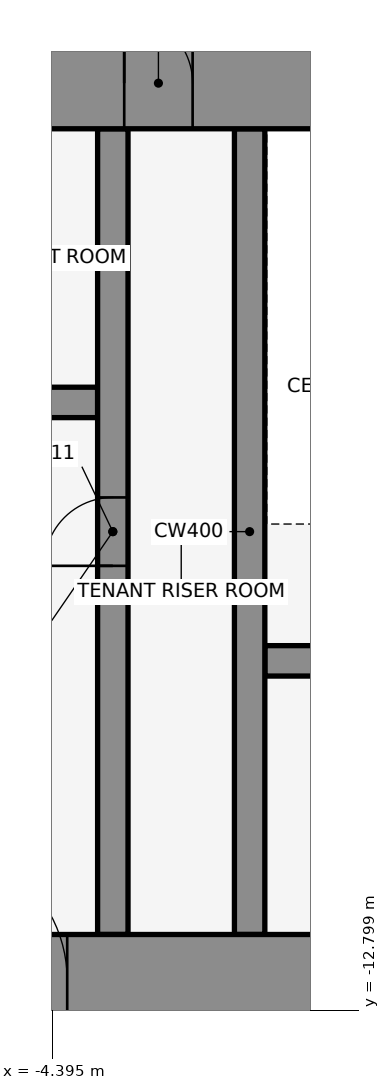
"""IFC4 building model, lengths in metres.
Left out: names, types, materials, properties, quantities, classifications, styles, units other than length and angle.
Written with IfcOpenShell. Run it as: python <this file> out.ifc"""

import sys

from ifc_helpers import new_model, si_unit, direction, frame, frame_2d, origin, place, context, subcontext, project, spatial, rectangle, extrude, element, fill, save


model = new_model("IFC4")
c1 = context("Model", 3, precision=1e-05, world=origin(), true_north=direction((0.0, 1.0)))
c2 = subcontext(c1, "Body", "Model", "MODEL_VIEW")
j1 = project(units=[si_unit("LENGTHUNIT", "METRE"), si_unit("PLANEANGLEUNIT", "RADIAN")], contexts=[c1])
p1 = place(None, origin())
s1 = spatial("IfcSite", under=j1, at=p1, CompositionType="ELEMENT")
p2 = place(p1, origin())
s2 = spatial("IfcBuilding", under=s1, at=p2, CompositionType="ELEMENT")
p3 = place(p2, frame((0.0, 0.0, 342.5)))
s3 = spatial("IfcBuildingStorey", under=s2, at=p3, CompositionType="ELEMENT", Elevation=342.5)
p4 = place(p3, frame((-0.068, -0.105, 0.0), z_axis=(0.0, 0.0, 1.0), x_axis=(-0.83981312244, 0.542875602121, 0.0)))
e1 = element("IfcWall", 1, at=p4, inside=s3, PredefinedType="STANDARD", context=c2, shape_type="SweptSolid", body=[
    extrude(rectangle(XDim=2.183, YDim=0.25, at=frame_2d((1.091, 0.0))), origin(), (0.0, 0.0, 1.0), 5.2),
])
p5 = place(p3, frame((-1.6, -8.2, 0.0), z_axis=(0.0, 0.0, 1.0), x_axis=(1.0, 0.0, 0.0)))
e2 = element("IfcWall", 2, at=p5, inside=s3, PredefinedType="SHEAR", context=c2, shape_type="SweptSolid", body=[
    extrude(rectangle(XDim=3.2, YDim=0.4, at=frame_2d((1.6, 0.0))), origin(), (0.0, 0.0, 1.0), 5.4),
])
p6 = place(p5, frame((1.05, 0.0, 0.0)))
e3 = element("IfcOpeningElement", 3, at=p6, cuts=e2, PredefinedType="OPENING", context=c2, shape_type="SweptSolid", body=[
    extrude(rectangle(XDim=1.2, YDim=2.1, at=frame_2d((0.6, 1.05))), frame((0.0, 0.212, 0.0), z_axis=(0.0, -1.0, 0.0), x_axis=(1.0, 0.0, 0.0)), (0.0, 0.0, 1.0), 0.424),
])
p7 = place(p3, frame((-8.5, -4.8, 0.0), z_axis=(0.0, 0.0, 1.0), x_axis=(1.0, 0.0, 0.0)))
e4 = element("IfcWall", 4, at=p7, inside=s3, PredefinedType="SHEAR", context=c2, shape_type="SweptSolid", body=[
    extrude(rectangle(XDim=4.7, YDim=0.4, at=frame_2d((2.35, 0.0))), origin(), (0.0, 0.0, 1.0), 5.4),
])
p8 = place(p7, frame((0.45, 0.0, 0.0)))
e5 = element("IfcOpeningElement", 5, at=p8, cuts=e4, PredefinedType="OPENING", context=c2, shape_type="SweptSolid", body=[
    extrude(rectangle(XDim=0.9, YDim=2.1, at=frame_2d((0.45, 1.05))), frame((0.0, 0.212, 0.0), z_axis=(0.0, -1.0, 0.0), x_axis=(1.0, 0.0, 0.0)), (0.0, 0.0, 1.0), 0.424),
])
p9 = place(p7, frame((2.85, 0.0, 0.0)))
e6 = element("IfcOpeningElement", 6, at=p9, cuts=e4, PredefinedType="OPENING", context=c2, shape_type="SweptSolid", body=[
    extrude(rectangle(XDim=0.9, YDim=2.1, at=frame_2d((0.45, 1.05))), frame((0.0, 0.212, 0.0), z_axis=(0.0, -1.0, 0.0), x_axis=(1.0, 0.0, 0.0)), (0.0, 0.0, 1.0), 0.424),
])
p10 = place(p3, frame((-3.6, -11.8, 0.0), z_axis=(0.0, 0.0, 1.0), x_axis=(0.0, 1.0, 0.0)))
e7 = element("IfcWall", 7, at=p10, inside=s3, PredefinedType="SHEAR", context=c2, shape_type="SweptSolid", body=[
    extrude(rectangle(XDim=10.6, YDim=0.4, at=frame_2d((5.3, 0.0))), origin(), (0.0, 0.0, 1.0), 5.4),
])
p11 = place(p10, frame((4.85, 0.0, 0.0)))
e8 = element("IfcOpeningElement", 8, at=p11, cuts=e7, PredefinedType="OPENING", context=c2, shape_type="SweptSolid", body=[
    extrude(rectangle(XDim=0.9, YDim=2.1, at=frame_2d((0.45, 1.05))), frame((0.0, 0.212, 0.0), z_axis=(0.0, -1.0, 0.0), x_axis=(1.0, 0.0, 0.0)), (0.0, 0.0, 1.0), 0.424),
])
p12 = place(p3, frame((-1.8, -11.8, 0.0), z_axis=(0.0, 0.0, 1.0), x_axis=(0.0, 1.0, 0.0)))
e9 = element("IfcWall", 9, at=p12, inside=s3, PredefinedType="SHEAR", context=c2, shape_type="SweptSolid", body=[
    extrude(rectangle(XDim=10.6, YDim=0.4, at=frame_2d((5.3, 0.0))), origin(), (0.0, 0.0, 1.0), 5.4),
])
p13 = place(p3, frame((-22.0, -0.6, 0.0), z_axis=(0.0, 0.0, 1.0), x_axis=(1.0, 0.0, 0.0)))
e10 = element("IfcWall", 10, at=p13, inside=s3, PredefinedType="SHEAR", context=c2, shape_type="SweptSolid", body=[
    extrude(rectangle(XDim=44.0, YDim=1.2, at=frame_2d((22.0, 0.0))), origin(), (0.0, 0.0, 1.0), 5.4),
])
p14 = place(p13, frame((18.55, 0.0, 0.0)))
e11 = element("IfcOpeningElement", 11, at=p14, cuts=e10, PredefinedType="OPENING", context=c2, shape_type="SweptSolid", body=[
    extrude(rectangle(XDim=0.9, YDim=2.1, at=frame_2d((0.45, 1.05))), frame((0.0, 0.612, 0.0), z_axis=(0.0, -1.0, 0.0), x_axis=(1.0, 0.0, 0.0)), (0.0, 0.0, 1.0), 1.224),
])
p15 = place(p13, frame((24.55, 0.0, 0.0)))
e12 = element("IfcOpeningElement", 12, at=p15, cuts=e10, PredefinedType="OPENING", context=c2, shape_type="SweptSolid", body=[
    extrude(rectangle(XDim=0.9, YDim=2.1, at=frame_2d((0.45, 1.05))), frame((0.0, 0.612, 0.0), z_axis=(0.0, -1.0, 0.0), x_axis=(1.0, 0.0, 0.0)), (0.0, 0.0, 1.0), 1.224),
])
p16 = place(p3, frame((-22.0, -12.4, 0.0), z_axis=(0.0, 0.0, 1.0), x_axis=(1.0, 0.0, 0.0)))
e13 = element("IfcWall", 13, at=p16, inside=s3, PredefinedType="SHEAR", context=c2, shape_type="SweptSolid", body=[
    extrude(rectangle(XDim=44.0, YDim=1.2, at=frame_2d((22.0, 0.0))), origin(), (0.0, 0.0, 1.0), 5.4),
])
p17 = place(p16, frame((2.2, 0.0, 0.0)))
e14 = element("IfcOpeningElement", 14, at=p17, cuts=e13, PredefinedType="OPENING", context=c2, shape_type="SweptSolid", body=[
    extrude(rectangle(XDim=1.2, YDim=2.1, at=frame_2d((0.6, 1.05))), frame((0.0, 0.612, 0.0), z_axis=(0.0, -1.0, 0.0), x_axis=(1.0, 0.0, 0.0)), (0.0, 0.0, 1.0), 1.224),
])
p18 = place(p16, frame((21.4, 0.0, 0.0)))
e15 = element("IfcOpeningElement", 15, at=p18, cuts=e13, PredefinedType="OPENING", context=c2, shape_type="SweptSolid", body=[
    extrude(rectangle(XDim=1.2, YDim=2.1, at=frame_2d((0.6, 1.05))), frame((0.0, 0.612, 0.0), z_axis=(0.0, -1.0, 0.0), x_axis=(1.0, 0.0, 0.0)), (0.0, 0.0, 1.0), 1.224),
])
p19 = place(p16, frame((40.6, 0.0, 0.0)))
e16 = element("IfcOpeningElement", 16, at=p19, cuts=e13, PredefinedType="OPENING", context=c2, shape_type="SweptSolid", body=[
    extrude(rectangle(XDim=1.2, YDim=2.1, at=frame_2d((0.6, 1.05))), frame((0.0, 0.612, 0.0), z_axis=(0.0, -1.0, 0.0), x_axis=(1.0, 0.0, 0.0)), (0.0, 0.0, 1.0), 1.224),
])
p20 = place(p16, frame((10.75, 0.0, 0.0)))
e17 = element("IfcOpeningElement", 17, at=p20, cuts=e13, PredefinedType="OPENING", context=c2, shape_type="SweptSolid", body=[
    extrude(rectangle(XDim=1.2, YDim=2.1, at=frame_2d((0.6, 1.05))), frame((0.0, 0.612, 0.0), z_axis=(0.0, -1.0, 0.0), x_axis=(1.0, 0.0, 0.0)), (0.0, 0.0, 1.0), 1.224),
])
p21 = place(p16, frame((16.0, 0.0, 0.0)))
e18 = element("IfcOpeningElement", 18, at=p21, cuts=e13, PredefinedType="OPENING", context=c2, shape_type="SweptSolid", body=[
    extrude(rectangle(XDim=1.8, YDim=2.1, at=frame_2d((0.9, 1.05))), frame((0.0, 0.612, 0.0), z_axis=(0.0, -1.0, 0.0), x_axis=(1.0, 0.0, 0.0)), (0.0, 0.0, 1.0), 1.224),
])
p22 = place(p16, frame((6.3, 0.0, 0.0)))
e19 = element("IfcOpeningElement", 19, at=p22, cuts=e13, PredefinedType="OPENING", context=c2, shape_type="SweptSolid", body=[
    extrude(rectangle(XDim=1.2, YDim=2.1, at=frame_2d((0.6, 1.05))), frame((0.0, 0.612, 0.0), z_axis=(0.0, -1.0, 0.0), x_axis=(1.0, 0.0, 0.0)), (0.0, 0.0, 1.0), 1.224),
])
p23 = place(p16, frame((26.2, 0.0, 0.0)))
e20 = element("IfcOpeningElement", 20, at=p23, cuts=e13, PredefinedType="OPENING", context=c2, shape_type="SweptSolid", body=[
    extrude(rectangle(XDim=1.8, YDim=2.1, at=frame_2d((0.9, 1.05))), frame((0.0, 0.612, 0.0), z_axis=(0.0, -1.0, 0.0), x_axis=(1.0, 0.0, 0.0)), (0.0, 0.0, 1.0), 1.224),
])
p24 = place(p16, frame((36.5, 0.0, 0.0)))
e21 = element("IfcOpeningElement", 21, at=p24, cuts=e13, PredefinedType="OPENING", context=c2, shape_type="SweptSolid", body=[
    extrude(rectangle(XDim=1.2, YDim=2.1, at=frame_2d((0.6, 1.05))), frame((0.0, 0.612, 0.0), z_axis=(0.0, -1.0, 0.0), x_axis=(1.0, 0.0, 0.0)), (0.0, 0.0, 1.0), 1.224),
])
p25 = place(p11, frame((0.9, 0.0, 0.0), z_axis=(0.0, 0.0, 1.0), x_axis=(-1.0, 0.0, 0.0)))
e22 = element("IfcDoor", 22, at=p25, inside=s3, OperationType="SINGLE_SWING_RIGHT", PredefinedType="DOOR", context=c2, shape_type="SweptSolid", body=[
    extrude(rectangle(XDim=0.9, YDim=2.1, at=frame_2d((0.45, 1.05))), frame((0.0, 0.025, 0.0), z_axis=(0.0, -1.0, 0.0), x_axis=(1.0, 0.0, 0.0)), (0.0, 0.0, 1.0), 0.05),
])
fill(e8, e22)
p26 = place(p14, origin())
e23 = element("IfcDoor", 23, at=p26, inside=s3, OperationType="SINGLE_SWING_LEFT", PredefinedType="DOOR", context=c2, shape_type="SweptSolid", body=[
    extrude(rectangle(XDim=0.9, YDim=2.1, at=frame_2d((0.45, 1.05))), frame((0.0, 0.025, 0.0), z_axis=(0.0, -1.0, 0.0), x_axis=(1.0, 0.0, 0.0)), (0.0, 0.0, 1.0), 0.05),
])
fill(e11, e23)
p27 = place(p21, origin())
e24 = element("IfcDoor", 24, at=p27, inside=s3, OperationType="SINGLE_SWING_LEFT", PredefinedType="DOOR", context=c2, shape_type="SweptSolid", body=[
    extrude(rectangle(XDim=1.8, YDim=2.1, at=frame_2d((0.9, 1.05))), frame((0.0, 0.025, 0.0), z_axis=(0.0, -1.0, 0.0), x_axis=(1.0, 0.0, 0.0)), (0.0, 0.0, 1.0), 0.05),
])
fill(e18, e24)
save(model, sys.argv[1])
